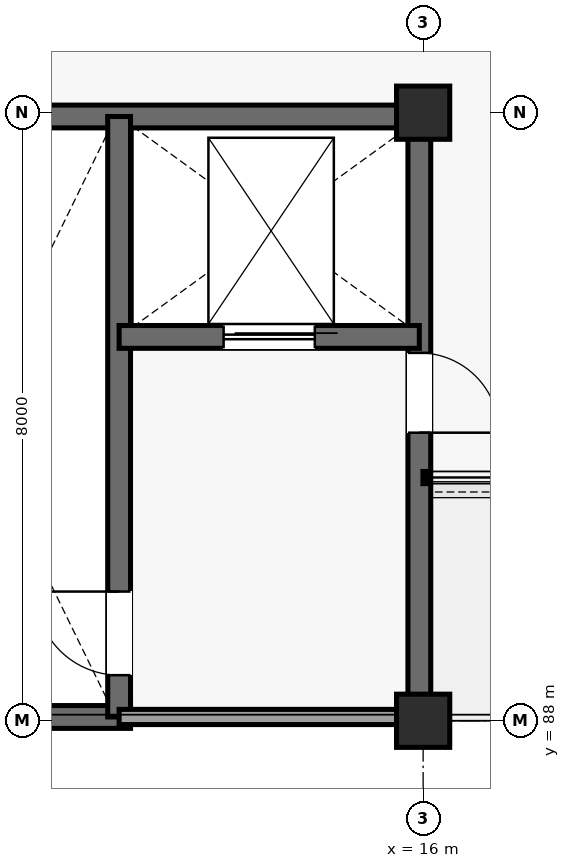
"""IFC4 building model, lengths in metres.
Left out: names, types, materials, properties, quantities, classifications, styles, units other than length and angle.
Written with IfcOpenShell. Run it as: python <this file> out.ifc"""

import sys

from ifc_helpers import new_model, si_unit, direction, frame, frame_2d, origin, origin_2d, place, context, subcontext, project, spatial, rectangle, extrude, element, fill, save


model = new_model("IFC4")
c1 = context("Model", 3, precision=1e-05, world=origin(), true_north=direction((0.0, 1.0)))
c2 = subcontext(c1, "Body", "Model", "MODEL_VIEW")
j1 = project(units=[si_unit("LENGTHUNIT", "METRE"), si_unit("PLANEANGLEUNIT", "RADIAN")], contexts=[c1])
p1 = place(None, origin())
s1 = spatial("IfcSite", under=j1, at=p1, CompositionType="ELEMENT")
p2 = place(p1, origin())
s2 = spatial("IfcBuilding", under=s1, at=p2, CompositionType="ELEMENT")
p3 = place(p2, frame((0.0, 0.0, 25.74)))
s3 = spatial("IfcBuildingStorey", under=s2, at=p3, CompositionType="ELEMENT", Elevation=25.74)
for number, where, z_axis, x_axis in (
    (1, (16.0, 88.0, 0.0), (0.0, 0.0, 1.0), (1.0, 0.0, 0.0)),
    (2, (16.0, 96.0, 0.0), (0.0, 0.0, 1.0), (1.0, 0.0, 0.0)),
):
    element("IfcColumn", number, at=place(p3, frame(where, z_axis=z_axis, x_axis=x_axis)), inside=s3, PredefinedType="COLUMN", context=c2, shape_type="SweptSolid", body=[
        extrude(rectangle(XDim=0.7, YDim=0.7, at=origin_2d()), origin(), (0.0, 0.0, 1.0), 4.29),
    ])
p4 = place(p3, frame((8.24, 95.95, 0.0), z_axis=(0.0, 0.0, 1.0), x_axis=(1.0, 0.0, 0.0)))
e3 = element("IfcWall", 3, at=p4, inside=s3, PredefinedType="SHEAR", context=c2, shape_type="SweptSolid", body=[
    extrude(rectangle(XDim=7.52, YDim=0.3, at=frame_2d((3.76, 0.0))), origin(), (0.0, 0.0, 1.0), 4.09),
])
p5 = place(p3, frame((15.95, 88.24, 0.0), z_axis=(0.0, 0.0, 1.0), x_axis=(0.0, 1.0, 0.0)))
e4 = element("IfcWall", 4, at=p5, inside=s3, PredefinedType="SHEAR", context=c2, shape_type="SweptSolid", body=[
    extrude(rectangle(XDim=7.52, YDim=0.3, at=frame_2d((3.76, 0.0))), origin(), (0.0, 0.0, 1.0), 4.09),
])
p6 = place(p5, frame((3.55, 0.0, 0.0)))
e5 = element("IfcOpeningElement", 5, at=p6, cuts=e4, PredefinedType="OPENING", context=c2, shape_type="SweptSolid", body=[
    extrude(rectangle(XDim=1.05, YDim=2.15, at=frame_2d((0.525, 1.075))), frame((0.0, 0.16, 0.0), z_axis=(0.0, -1.0, 0.0), x_axis=(1.0, 0.0, 0.0)), (0.0, 0.0, 1.0), 0.32),
])
p7 = place(p3, frame((8.24, 88.05, 0.0), z_axis=(0.0, 0.0, 1.0), x_axis=(1.0, 0.0, 0.0)))
e6 = element("IfcWall", 6, at=p7, inside=s3, PredefinedType="SHEAR", context=c2, shape_type="SweptSolid", body=[
    extrude(rectangle(XDim=3.91, YDim=0.3, at=frame_2d((1.955, 0.0))), origin(), (0.0, 0.0, 1.0), 4.09),
])
p8 = place(p3, frame((12.0, 88.05, 0.0), z_axis=(0.0, 0.0, 1.0), x_axis=(0.0, 1.0, 0.0)))
e7 = element("IfcWall", 7, at=p8, inside=s3, PredefinedType="SHEAR", context=c2, shape_type="SweptSolid", body=[
    extrude(rectangle(XDim=7.9, YDim=0.3, at=frame_2d((3.95, 0.0))), origin(), (0.0, 0.0, 1.0), 4.09),
])
p9 = place(p8, frame((0.55, 0.0, 0.0)))
e8 = element("IfcOpeningElement", 8, at=p9, cuts=e7, PredefinedType="OPENING", context=c2, shape_type="SweptSolid", body=[
    extrude(rectangle(XDim=1.1, YDim=2.15, at=frame_2d((0.55, 1.075))), frame((0.0, 0.16, 0.0), z_axis=(0.0, -1.0, 0.0), x_axis=(1.0, 0.0, 0.0)), (0.0, 0.0, 1.0), 0.32),
])
p10 = place(p3, frame((12.0, 93.05, 0.0), z_axis=(0.0, 0.0, 1.0), x_axis=(1.0, 0.0, 0.0)))
e9 = element("IfcWall", 9, at=p10, inside=s3, PredefinedType="SHEAR", context=c2, shape_type="SweptSolid", body=[
    extrude(rectangle(XDim=3.95, YDim=0.3, at=frame_2d((1.975, 0.0))), origin(), (0.0, 0.0, 1.0), 4.09),
])
p11 = place(p10, frame((1.375, 0.0, 0.0)))
e10 = element("IfcOpeningElement", 10, at=p11, cuts=e9, PredefinedType="OPENING", context=c2, shape_type="SweptSolid", body=[
    extrude(rectangle(XDim=1.2, YDim=2.2, at=frame_2d((0.6, 1.1))), frame((0.0, 0.16, 0.0), z_axis=(0.0, -1.0, 0.0), x_axis=(1.0, 0.0, 0.0)), (0.0, 0.0, 1.0), 0.32),
])
p12 = place(p3, frame((12.0, 88.05, 0.0), z_axis=(0.0, 0.0, 1.0), x_axis=(1.0, 0.0, 0.0)))
e11 = element("IfcWall", 11, at=p12, inside=s3, PredefinedType="PARTITIONING", context=c2, shape_type="SweptSolid", body=[
    extrude(rectangle(XDim=3.66, YDim=0.2, at=frame_2d((1.83, 0.0))), origin(), (0.0, 0.0, 1.0), 3.408),
])
p13 = place(p9, origin())
e12 = element("IfcDoor", 12, at=p13, inside=s3, OperationType="SINGLE_SWING_RIGHT", PredefinedType="DOOR", context=c2, shape_type="SweptSolid", body=[
    extrude(rectangle(XDim=1.1, YDim=2.15, at=frame_2d((0.55, 1.075))), frame((0.0, 0.025, 0.0), z_axis=(0.0, -1.0, 0.0), x_axis=(1.0, 0.0, 0.0)), (0.0, 0.0, 1.0), 0.05),
])
fill(e8, e12)
p14 = place(p11, origin())
e13 = element("IfcDoor", 13, at=p14, inside=s3, OperationType="SLIDING_TO_LEFT", PredefinedType="DOOR", context=c2, shape_type="SweptSolid", body=[
    extrude(rectangle(XDim=1.2, YDim=2.2, at=frame_2d((0.6, 1.1))), frame((0.0, 0.025, 0.0), z_axis=(0.0, -1.0, 0.0), x_axis=(1.0, 0.0, 0.0)), (0.0, 0.0, 1.0), 0.05),
])
fill(e10, e13)
p15 = place(p6, frame((1.05, 0.0, 0.0), z_axis=(0.0, 0.0, 1.0), x_axis=(-1.0, 0.0, 0.0)))
e14 = element("IfcDoor", 14, at=p15, inside=s3, OperationType="SINGLE_SWING_LEFT", PredefinedType="DOOR", context=c2, shape_type="SweptSolid", body=[
    extrude(rectangle(XDim=1.05, YDim=2.15, at=frame_2d((0.525, 1.075))), frame((0.0, 0.025, 0.0), z_axis=(0.0, -1.0, 0.0), x_axis=(1.0, 0.0, 0.0)), (0.0, 0.0, 1.0), 0.05),
])
fill(e5, e14)
save(model, sys.argv[1])
